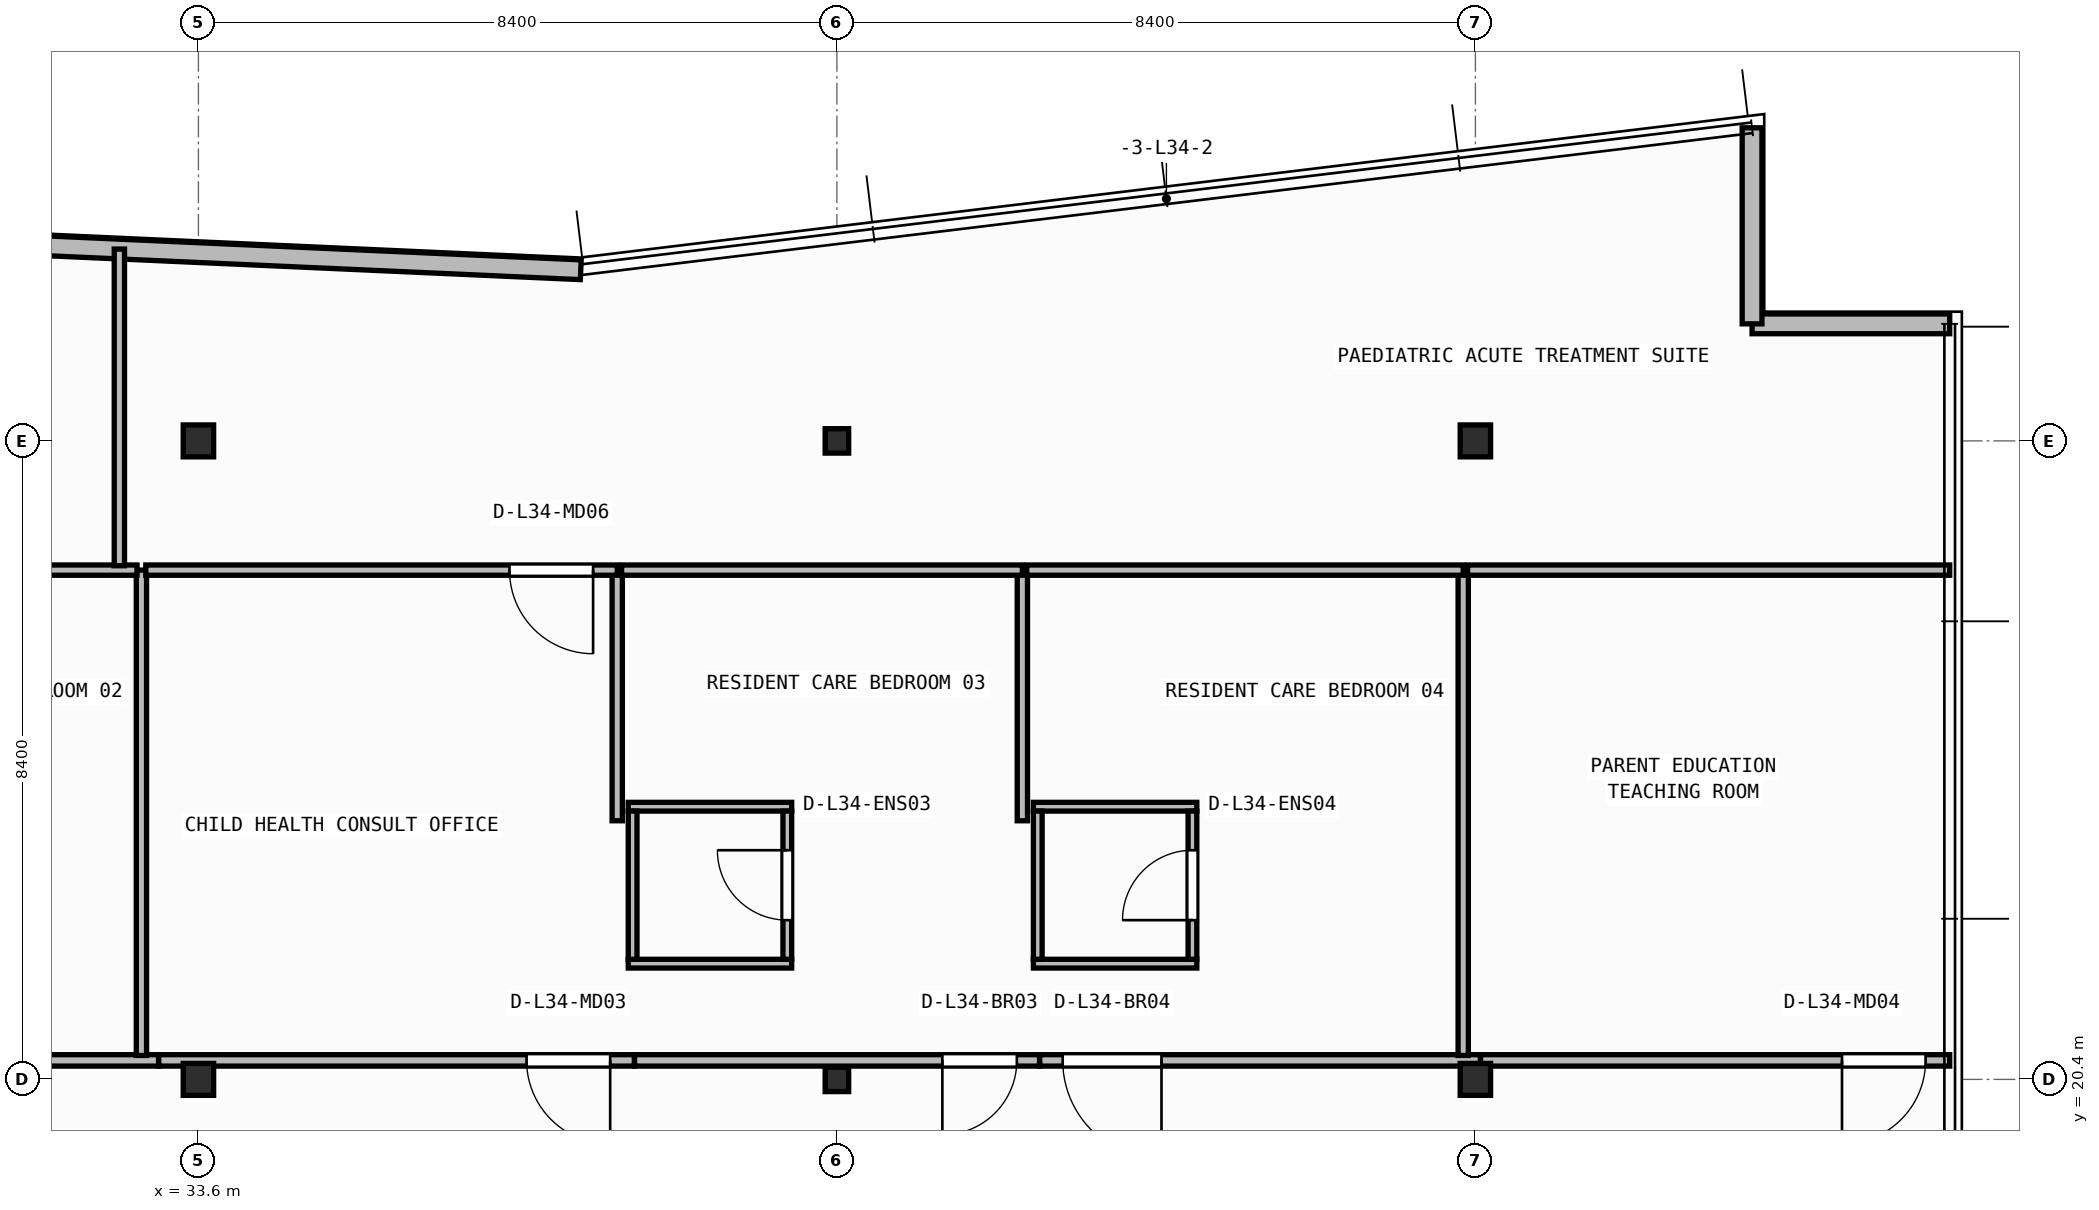
"""IFC4 building model, lengths in metres.
Left out: names, types, materials, properties, quantities, classifications, styles, units other than length and angle.
Written with IfcOpenShell. Run it as: python <this file> out.ifc"""

import sys

from ifc_helpers import new_model, si_unit, direction, frame, frame_2d, origin, origin_2d, place, context, subcontext, project, spatial, rectangle, i_section, extrude, element, fill, save


model = new_model("IFC4")
c1 = context("Model", 3, precision=1e-05, world=origin(), true_north=direction((0.0, 1.0)))
c2 = subcontext(c1, "Body", "Model", "MODEL_VIEW")
j1 = project(units=[si_unit("LENGTHUNIT", "METRE"), si_unit("PLANEANGLEUNIT", "RADIAN")], contexts=[c1])
p1 = place(None, origin())
s1 = spatial("IfcSite", under=j1, at=p1, CompositionType="ELEMENT")
p2 = place(p1, origin())
s2 = spatial("IfcBuilding", under=s1, at=p2, CompositionType="ELEMENT")
p3 = place(p2, frame((0.0, 0.0, 138.9)))
s3 = spatial("IfcBuildingStorey", under=s2, at=p3, CompositionType="ELEMENT", Elevation=138.9)
p4 = place(p3, frame((33.6, 20.4, 0.0), z_axis=(0.0, 0.0, 1.0), x_axis=(1.0, 0.0, 0.0)))
e1 = element("IfcColumn", 1, at=p4, inside=s3, PredefinedType="COLUMN", context=c2, shape_type="SweptSolid", body=[
    extrude(i_section(OverallWidth=0.4, OverallDepth=0.42, WebThickness=0.025, FlangeThickness=0.04, at=origin_2d()), origin(), (0.0, 0.0, 1.0), 3.95),
])
p5 = place(p3, frame((42.0, 20.4, 0.0), z_axis=(0.0, 0.0, 1.0), x_axis=(1.0, 0.0, 0.0)))
e2 = element("IfcColumn", 2, at=p5, inside=s3, PredefinedType="COLUMN", context=c2, shape_type="SweptSolid", body=[
    extrude(i_section(OverallWidth=0.309, OverallDepth=0.321, WebThickness=0.014, FlangeThickness=0.022, FilletRadius=0.017, at=origin_2d()), origin(), (0.0, 0.0, 1.0), 3.95),
])
for number, where, z_axis, x_axis in (
    (3, (50.4, 20.4, 0.0), (0.0, 0.0, 1.0), (1.0, 0.0, 0.0)),
    (4, (33.6, 28.8, 0.0), (0.0, 0.0, 1.0), (1.0, 0.0, 0.0)),
):
    element("IfcColumn", number, at=place(p3, frame(where, z_axis=z_axis, x_axis=x_axis)), inside=s3, PredefinedType="COLUMN", context=c2, shape_type="SweptSolid", body=[
        extrude(i_section(OverallWidth=0.4, OverallDepth=0.42, WebThickness=0.025, FlangeThickness=0.04, at=origin_2d()), origin(), (0.0, 0.0, 1.0), 3.95),
    ])
p6 = place(p3, frame((42.0, 28.8, 0.0), z_axis=(0.0, 0.0, 1.0), x_axis=(1.0, 0.0, 0.0)))
e5 = element("IfcColumn", 5, at=p6, inside=s3, PredefinedType="COLUMN", context=c2, shape_type="SweptSolid", body=[
    extrude(i_section(OverallWidth=0.309, OverallDepth=0.321, WebThickness=0.014, FlangeThickness=0.022, FilletRadius=0.017, at=origin_2d()), origin(), (0.0, 0.0, 1.0), 3.95),
])
p7 = place(p3, frame((50.4, 28.8, 0.0), z_axis=(0.0, 0.0, 1.0), x_axis=(1.0, 0.0, 0.0)))
e6 = element("IfcColumn", 6, at=p7, inside=s3, PredefinedType="COLUMN", context=c2, shape_type="SweptSolid", body=[
    extrude(i_section(OverallWidth=0.4, OverallDepth=0.42, WebThickness=0.025, FlangeThickness=0.04, at=origin_2d()), origin(), (0.0, 0.0, 1.0), 3.95),
])
p8 = place(p3, frame((56.64, 30.34, 0.0), z_axis=(0.0, 0.0, 1.0), x_axis=(-1.0, 0.0, 0.0)))
e7 = element("IfcWall", 7, at=p8, inside=s3, PredefinedType="STANDARD", context=c2, shape_type="SweptSolid", body=[
    extrude(rectangle(XDim=2.6, YDim=0.26, at=frame_2d((1.3, 0.0))), origin(), (0.0, 0.0, 1.0), 3.71),
])
p9 = place(p3, frame((54.04, 30.34, 0.0), z_axis=(0.0, 0.0, 1.0), x_axis=(0.0, 1.0, 0.0)))
e8 = element("IfcWall", 8, at=p9, inside=s3, PredefinedType="STANDARD", context=c2, shape_type="SweptSolid", body=[
    extrude(rectangle(XDim=2.579, YDim=0.26, at=frame_2d((1.29, 0.0))), origin(), (0.0, 0.0, 1.0), 3.71),
])
p10 = place(p3, frame((38.63, 31.052, 0.0), z_axis=(0.0, 0.0, 1.0), x_axis=(-0.998996592956, 0.044786239663, 0.0)))
e9 = element("IfcWall", 9, at=p10, inside=s3, PredefinedType="STANDARD", context=c2, shape_type="SweptSolid", body=[
    extrude(rectangle(XDim=14.827, YDim=0.26, at=frame_2d((7.414, 0.0))), origin(), (0.0, 0.0, 1.0), 3.71),
])
p11 = place(p10, frame((9.262, 0.0, 0.9)))
e10 = element("IfcOpeningElement", 10, at=p11, cuts=e9, PredefinedType="OPENING", context=c2, shape_type="SweptSolid", body=[
    extrude(rectangle(XDim=2.4, YDim=1.65, at=frame_2d((1.2, 0.825))), frame((0.0, 0.14, 0.0), z_axis=(0.0, -1.0, 0.0), x_axis=(1.0, 0.0, 0.0)), (0.0, 0.0, 1.0), 0.28),
])
for number, where, z_axis, x_axis in (
    (11, (39.255, 21.923, 0.0), (0.0, 0.0, 1.0), (1.0, 0.0, 0.0)),
    (12, (39.255, 23.988, 0.0), (0.0, 0.0, 1.0), (1.0, 0.0, 0.0)),
):
    element("IfcWall", number, at=place(p3, frame(where, z_axis=z_axis, x_axis=x_axis)), inside=s3, PredefinedType="PARTITIONING", context=c2, shape_type="SweptSolid", body=[
        extrude(rectangle(XDim=2.15, YDim=0.115, at=frame_2d((1.075, 0.0))), origin(), (0.0, 0.0, 1.0), 3.71),
    ])
p12 = place(p3, frame((39.312, 21.98, 0.0), z_axis=(0.0, 0.0, 1.0), x_axis=(0.0, 1.0, 0.0)))
e13 = element("IfcWall", 13, at=p12, inside=s3, PredefinedType="PARTITIONING", context=c2, shape_type="SweptSolid", body=[
    extrude(rectangle(XDim=1.95, YDim=0.115, at=frame_2d((0.975, 0.0))), origin(), (0.0, 0.0, 1.0), 3.71),
])
p13 = place(p3, frame((41.347, 21.98, 0.0), z_axis=(0.0, 0.0, 1.0), x_axis=(0.0, 1.0, 0.0)))
e14 = element("IfcWall", 14, at=p13, inside=s3, PredefinedType="PARTITIONING", context=c2, shape_type="SweptSolid", body=[
    extrude(rectangle(XDim=1.95, YDim=0.115, at=frame_2d((0.975, 0.0))), origin(), (0.0, 0.0, 1.0), 3.71),
])
p14 = place(p13, frame((0.515, 0.0, 0.0)))
e15 = element("IfcOpeningElement", 15, at=p14, cuts=e14, PredefinedType="OPENING", context=c2, shape_type="SweptSolid", body=[
    extrude(rectangle(XDim=0.92, YDim=2.1, at=frame_2d((0.46, 1.05))), frame((0.0, 0.067, 0.0), z_axis=(0.0, -1.0, 0.0), x_axis=(1.0, 0.0, 0.0)), (0.0, 0.0, 1.0), 0.135),
])
for number, where, z_axis, x_axis in (
    (16, (44.585, 21.923, 0.0), (0.0, 0.0, 1.0), (1.0, 0.0, 0.0)),
    (17, (44.585, 23.988, 0.0), (0.0, 0.0, 1.0), (1.0, 0.0, 0.0)),
):
    element("IfcWall", number, at=place(p3, frame(where, z_axis=z_axis, x_axis=x_axis)), inside=s3, PredefinedType="PARTITIONING", context=c2, shape_type="SweptSolid", body=[
        extrude(rectangle(XDim=2.15, YDim=0.115, at=frame_2d((1.075, 0.0))), origin(), (0.0, 0.0, 1.0), 3.71),
    ])
p15 = place(p3, frame((44.643, 21.98, 0.0), z_axis=(0.0, 0.0, 1.0), x_axis=(0.0, 1.0, 0.0)))
e18 = element("IfcWall", 18, at=p15, inside=s3, PredefinedType="PARTITIONING", context=c2, shape_type="SweptSolid", body=[
    extrude(rectangle(XDim=1.95, YDim=0.115, at=frame_2d((0.975, 0.0))), origin(), (0.0, 0.0, 1.0), 3.71),
])
p16 = place(p3, frame((46.677, 21.98, 0.0), z_axis=(0.0, 0.0, 1.0), x_axis=(0.0, 1.0, 0.0)))
e19 = element("IfcWall", 19, at=p16, inside=s3, PredefinedType="PARTITIONING", context=c2, shape_type="SweptSolid", body=[
    extrude(rectangle(XDim=1.95, YDim=0.115, at=frame_2d((0.975, 0.0))), origin(), (0.0, 0.0, 1.0), 3.71),
])
p17 = place(p16, frame((0.515, 0.0, 0.0)))
e20 = element("IfcOpeningElement", 20, at=p17, cuts=e19, PredefinedType="OPENING", context=c2, shape_type="SweptSolid", body=[
    extrude(rectangle(XDim=0.92, YDim=2.1, at=frame_2d((0.46, 1.05))), frame((0.0, 0.067, 0.0), z_axis=(0.0, -1.0, 0.0), x_axis=(1.0, 0.0, 0.0)), (0.0, 0.0, 1.0), 0.135),
])
p18 = place(p3, frame((33.076, 20.65, 0.0), z_axis=(0.0, 0.0, 1.0), x_axis=(-1.0, 0.0, 0.0)))
e21 = element("IfcWall", 21, at=p18, inside=s3, PredefinedType="PARTITIONING", context=c2, shape_type="SweptSolid", body=[
    extrude(rectangle(XDim=5.798, YDim=0.15, at=frame_2d((2.899, 0.0))), origin(), (0.0, 0.0, 1.0), 3.083),
])
p19 = place(p18, frame((3.069, 0.0, 0.0)))
e22 = element("IfcOpeningElement", 22, at=p19, cuts=e21, PredefinedType="OPENING", context=c2, shape_type="SweptSolid", body=[
    extrude(rectangle(XDim=1.3, YDim=2.15, at=frame_2d((0.65, 1.075))), frame((0.0, 0.085, 0.0), z_axis=(0.0, -1.0, 0.0), x_axis=(1.0, 0.0, 0.0)), (0.0, 0.0, 1.0), 0.17),
])
p20 = place(p3, frame((39.336, 20.65, 0.0), z_axis=(0.0, 0.0, 1.0), x_axis=(-1.0, 0.0, 0.0)))
e23 = element("IfcWall", 23, at=p20, inside=s3, PredefinedType="PARTITIONING", context=c2, shape_type="SweptSolid", body=[
    extrude(rectangle(XDim=6.258, YDim=0.15, at=frame_2d((3.129, 0.0))), origin(), (0.0, 0.0, 1.0), 3.083),
])
p21 = place(p20, frame((0.319, 0.0, 0.0)))
e24 = element("IfcOpeningElement", 24, at=p21, cuts=e23, PredefinedType="OPENING", context=c2, shape_type="SweptSolid", body=[
    extrude(rectangle(XDim=1.1, YDim=2.1, at=frame_2d((0.55, 1.05))), frame((0.0, 0.085, 0.0), z_axis=(0.0, -1.0, 0.0), x_axis=(1.0, 0.0, 0.0)), (0.0, 0.0, 1.0), 0.17),
])
p22 = place(p3, frame((44.666, 20.65, 0.0), z_axis=(0.0, 0.0, 1.0), x_axis=(-1.0, 0.0, 0.0)))
e25 = element("IfcWall", 25, at=p22, inside=s3, PredefinedType="PARTITIONING", context=c2, shape_type="SweptSolid", body=[
    extrude(rectangle(XDim=5.328, YDim=0.15, at=frame_2d((2.664, 0.0))), origin(), (0.0, 0.0, 1.0), 3.083),
])
p23 = place(p22, frame((0.299, 0.0, 0.0)))
e26 = element("IfcOpeningElement", 26, at=p23, cuts=e25, PredefinedType="OPENING", context=c2, shape_type="SweptSolid", body=[
    extrude(rectangle(XDim=0.98, YDim=2.1, at=frame_2d((0.49, 1.05))), frame((0.0, 0.085, 0.0), z_axis=(0.0, -1.0, 0.0), x_axis=(1.0, 0.0, 0.0)), (0.0, 0.0, 1.0), 0.17),
])
p24 = place(p3, frame((50.466, 20.65, 0.0), z_axis=(0.0, 0.0, 1.0), x_axis=(-1.0, 0.0, 0.0)))
e27 = element("IfcWall", 27, at=p24, inside=s3, PredefinedType="PARTITIONING", context=c2, shape_type="SweptSolid", body=[
    extrude(rectangle(XDim=5.798, YDim=0.15, at=frame_2d((2.899, 0.0))), origin(), (0.0, 0.0, 1.0), 3.083),
])
p25 = place(p24, frame((4.196, 0.0, 0.0)))
e28 = element("IfcOpeningElement", 28, at=p25, cuts=e27, PredefinedType="OPENING", context=c2, shape_type="SweptSolid", body=[
    extrude(rectangle(XDim=1.3, YDim=2.15, at=frame_2d((0.65, 1.075))), frame((0.0, 0.085, 0.0), z_axis=(0.0, -1.0, 0.0), x_axis=(1.0, 0.0, 0.0)), (0.0, 0.0, 1.0), 0.17),
])
p26 = place(p3, frame((56.64, 20.65, 0.0), z_axis=(0.0, 0.0, 1.0), x_axis=(-1.0, 0.0, 0.0)))
e29 = element("IfcWall", 29, at=p26, inside=s3, PredefinedType="PARTITIONING", context=c2, shape_type="SweptSolid", body=[
    extrude(rectangle(XDim=6.172, YDim=0.15, at=frame_2d((3.086, 0.0))), origin(), (0.0, 0.0, 1.0), 3.71),
])
p27 = place(p26, frame((0.317, 0.0, 0.0)))
e30 = element("IfcOpeningElement", 30, at=p27, cuts=e29, PredefinedType="OPENING", context=c2, shape_type="SweptSolid", body=[
    extrude(rectangle(XDim=1.1, YDim=2.1, at=frame_2d((0.55, 1.05))), frame((0.0, 0.085, 0.0), z_axis=(0.0, -1.0, 0.0), x_axis=(1.0, 0.0, 0.0)), (0.0, 0.0, 1.0), 0.17),
])
p28 = place(p3, frame((32.85, 20.715, 0.0), z_axis=(0.0, 0.0, 1.0), x_axis=(0.0, 1.0, 0.0)))
e31 = element("IfcWall", 31, at=p28, inside=s3, PredefinedType="PARTITIONING", context=c2, shape_type="SweptSolid", body=[
    extrude(rectangle(XDim=6.385, YDim=0.135, at=frame_2d((3.192, 0.0))), origin(), (0.0, 0.0, 1.0), 3.71),
])
p29 = place(p3, frame((32.792, 27.1, 0.0), z_axis=(0.0, 0.0, 1.0), x_axis=(-1.0, 0.0, 0.0)))
e32 = element("IfcWall", 32, at=p29, inside=s3, PredefinedType="PARTITIONING", context=c2, shape_type="SweptSolid", body=[
    extrude(rectangle(XDim=5.685, YDim=0.135, at=frame_2d((2.843, 0.0))), origin(), (0.0, 0.0, 1.0), 3.71),
])
p30 = place(p3, frame((39.11, 23.802, 0.0), z_axis=(0.0, 0.0, 1.0), x_axis=(0.0, 1.0, 0.0)))
e33 = element("IfcWall", 33, at=p30, inside=s3, PredefinedType="PARTITIONING", context=c2, shape_type="SweptSolid", body=[
    extrude(rectangle(XDim=3.298, YDim=0.135, at=frame_2d((1.649, 0.0))), origin(), (0.0, 0.0, 1.0), 3.71),
])
p31 = place(p3, frame((39.11, 27.1, 0.0), z_axis=(0.0, 0.0, 1.0), x_axis=(-1.0, 0.0, 0.0)))
e34 = element("IfcWall", 34, at=p31, inside=s3, PredefinedType="PARTITIONING", context=c2, shape_type="SweptSolid", body=[
    extrude(rectangle(XDim=6.203, YDim=0.135, at=frame_2d((3.101, 0.0))), origin(), (0.0, 0.0, 1.0), 3.71),
])
p32 = place(p31, frame((0.318, 0.0, 0.0)))
e35 = element("IfcOpeningElement", 35, at=p32, cuts=e34, PredefinedType="OPENING", context=c2, shape_type="SweptSolid", body=[
    extrude(rectangle(XDim=1.1, YDim=2.1, at=frame_2d((0.55, 1.05))), frame((0.0, 0.077, 0.0), z_axis=(0.0, -1.0, 0.0), x_axis=(1.0, 0.0, 0.0)), (0.0, 0.0, 1.0), 0.155),
])
p33 = place(p3, frame((44.44, 23.802, 0.0), z_axis=(0.0, 0.0, 1.0), x_axis=(0.0, 1.0, 0.0)))
e36 = element("IfcWall", 36, at=p33, inside=s3, PredefinedType="PARTITIONING", context=c2, shape_type="SweptSolid", body=[
    extrude(rectangle(XDim=3.298, YDim=0.135, at=frame_2d((1.649, 0.0))), origin(), (0.0, 0.0, 1.0), 3.71),
])
p34 = place(p3, frame((44.44, 27.1, 0.0), z_axis=(0.0, 0.0, 1.0), x_axis=(-1.0, 0.0, 0.0)))
e37 = element("IfcWall", 37, at=p34, inside=s3, PredefinedType="PARTITIONING", context=c2, shape_type="SweptSolid", body=[
    extrude(rectangle(XDim=5.272, YDim=0.135, at=frame_2d((2.636, 0.0))), origin(), (0.0, 0.0, 1.0), 3.71),
])
p35 = place(p3, frame((50.24, 20.715, 0.0), z_axis=(0.0, 0.0, 1.0), x_axis=(0.0, 1.0, 0.0)))
e38 = element("IfcWall", 38, at=p35, inside=s3, PredefinedType="PARTITIONING", context=c2, shape_type="SweptSolid", body=[
    extrude(rectangle(XDim=6.385, YDim=0.135, at=frame_2d((3.192, 0.0))), origin(), (0.0, 0.0, 1.0), 3.152),
])
p36 = place(p3, frame((50.24, 27.1, 0.0), z_axis=(0.0, 0.0, 1.0), x_axis=(-1.0, 0.0, 0.0)))
e39 = element("IfcWall", 39, at=p36, inside=s3, PredefinedType="PARTITIONING", context=c2, shape_type="SweptSolid", body=[
    extrude(rectangle(XDim=5.742, YDim=0.135, at=frame_2d((2.871, 0.0))), origin(), (0.0, 0.0, 1.0), 3.71),
])
p37 = place(p3, frame((56.64, 27.1, 0.0), z_axis=(0.0, 0.0, 1.0), x_axis=(-1.0, 0.0, 0.0)))
e40 = element("IfcWall", 40, at=p37, inside=s3, PredefinedType="PARTITIONING", context=c2, shape_type="SweptSolid", body=[
    extrude(rectangle(XDim=6.342, YDim=0.135, at=frame_2d((3.171, 0.0))), origin(), (0.0, 0.0, 1.0), 3.71),
])
p38 = place(p3, frame((32.56, 27.157, 0.0), z_axis=(0.0, 0.0, 1.0), x_axis=(0.0, 1.0, 0.0)))
e41 = element("IfcWall", 41, at=p38, inside=s3, PredefinedType="PARTITIONING", context=c2, shape_type="SweptSolid", body=[
    extrude(rectangle(XDim=4.166, YDim=0.135, at=frame_2d((2.083, 0.0))), origin(), (0.0, 0.0, 1.0), 3.71),
])
p39 = place(p14, origin())
e42 = element("IfcDoor", 42, at=p39, inside=s3, OperationType="SINGLE_SWING_RIGHT", PredefinedType="DOOR", context=c2, shape_type="SweptSolid", body=[
    extrude(rectangle(XDim=0.92, YDim=2.1, at=frame_2d((0.46, 1.05))), frame((0.0, 0.025, 0.0), z_axis=(0.0, -1.0, 0.0), x_axis=(1.0, 0.0, 0.0)), (0.0, 0.0, 1.0), 0.05),
])
fill(e15, e42)
p40 = place(p17, origin())
e43 = element("IfcDoor", 43, at=p40, inside=s3, OperationType="SINGLE_SWING_LEFT", PredefinedType="DOOR", context=c2, shape_type="SweptSolid", body=[
    extrude(rectangle(XDim=0.92, YDim=2.1, at=frame_2d((0.46, 1.05))), frame((0.0, 0.025, 0.0), z_axis=(0.0, -1.0, 0.0), x_axis=(1.0, 0.0, 0.0)), (0.0, 0.0, 1.0), 0.05),
])
fill(e20, e43)
p41 = place(p21, origin())
e44 = element("IfcDoor", 44, at=p41, inside=s3, OperationType="SINGLE_SWING_LEFT", PredefinedType="DOOR", context=c2, shape_type="SweptSolid", body=[
    extrude(rectangle(XDim=1.1, YDim=2.1, at=frame_2d((0.55, 1.05))), frame((0.0, 0.025, 0.0), z_axis=(0.0, -1.0, 0.0), x_axis=(1.0, 0.0, 0.0)), (0.0, 0.0, 1.0), 0.05),
])
fill(e24, e44)
p42 = place(p23, origin())
e45 = element("IfcDoor", 45, at=p42, inside=s3, OperationType="SINGLE_SWING_RIGHT", PredefinedType="DOOR", context=c2, shape_type="SweptSolid", body=[
    extrude(rectangle(XDim=0.98, YDim=2.1, at=frame_2d((0.49, 1.05))), frame((0.0, 0.025, 0.0), z_axis=(0.0, -1.0, 0.0), x_axis=(1.0, 0.0, 0.0)), (0.0, 0.0, 1.0), 0.05),
])
fill(e26, e45)
p43 = place(p25, origin())
e46 = element("IfcDoor", 46, at=p43, inside=s3, OperationType="SINGLE_SWING_LEFT", PredefinedType="DOOR", context=c2, shape_type="SweptSolid", body=[
    extrude(rectangle(XDim=1.3, YDim=2.15, at=frame_2d((0.65, 1.075))), frame((0.0, 0.025, 0.0), z_axis=(0.0, -1.0, 0.0), x_axis=(1.0, 0.0, 0.0)), (0.0, 0.0, 1.0), 0.05),
])
fill(e28, e46)
p44 = place(p27, origin())
e47 = element("IfcDoor", 47, at=p44, inside=s3, OperationType="SINGLE_SWING_RIGHT", PredefinedType="DOOR", context=c2, shape_type="SweptSolid", body=[
    extrude(rectangle(XDim=1.1, YDim=2.1, at=frame_2d((0.55, 1.05))), frame((0.0, 0.025, 0.0), z_axis=(0.0, -1.0, 0.0), x_axis=(1.0, 0.0, 0.0)), (0.0, 0.0, 1.0), 0.05),
])
fill(e30, e47)
p45 = place(p32, origin())
e48 = element("IfcDoor", 48, at=p45, inside=s3, OperationType="SINGLE_SWING_LEFT", PredefinedType="DOOR", context=c2, shape_type="SweptSolid", body=[
    extrude(rectangle(XDim=1.1, YDim=2.1, at=frame_2d((0.55, 1.05))), frame((0.0, 0.025, 0.0), z_axis=(0.0, -1.0, 0.0), x_axis=(1.0, 0.0, 0.0)), (0.0, 0.0, 1.0), 0.05),
])
fill(e35, e48)
save(model, sys.argv[1])
